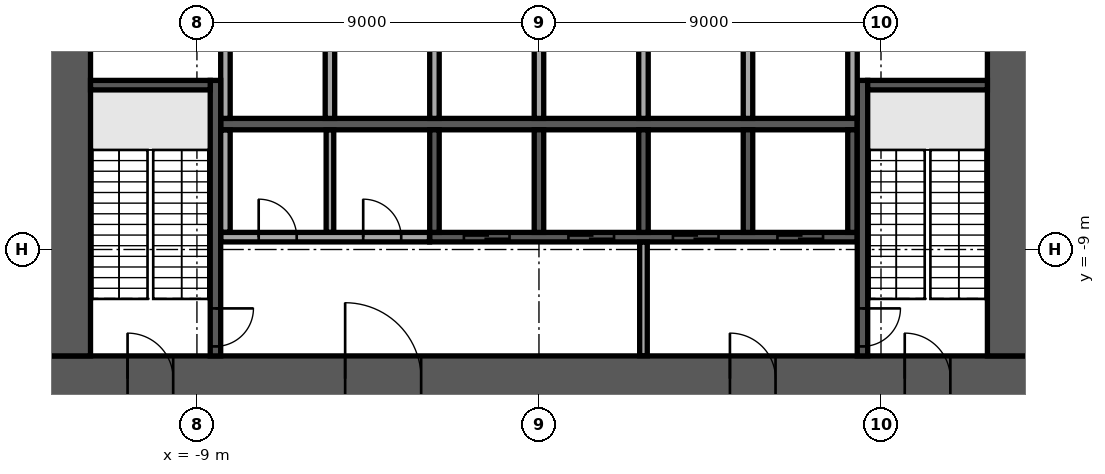
"""IFC4 building model, lengths in metres.
Left out: names, types, materials, properties, quantities, classifications, styles, units other than length and angle.
Written with IfcOpenShell. Run it as: python <this file> out.ifc"""

import sys

from ifc_helpers import new_model, si_unit, direction, frame, frame_2d, origin, place, context, subcontext, project, spatial, rectangle, extrude, element, fill, save


model = new_model("IFC4")
c1 = context("Model", 3, precision=1e-05, world=origin(), true_north=direction((0.0, 1.0)))
c2 = subcontext(c1, "Body", "Model", "MODEL_VIEW")
j1 = project(units=[si_unit("LENGTHUNIT", "METRE"), si_unit("PLANEANGLEUNIT", "RADIAN")], contexts=[c1])
p1 = place(None, origin())
s1 = spatial("IfcSite", under=j1, at=p1, CompositionType="ELEMENT")
p2 = place(p1, origin())
s2 = spatial("IfcBuilding", under=s1, at=p2, CompositionType="ELEMENT")
p3 = place(p2, frame((0.0, 0.0, 76.5)))
s3 = spatial("IfcBuildingStorey", under=s2, at=p3, CompositionType="ELEMENT", Elevation=76.5)
p4 = place(p3, frame((-13.0, -12.4, 0.0), z_axis=(0.0, 0.0, 1.0), x_axis=(1.0, 0.0, 0.0)))
e1 = element("IfcWall", 1, at=p4, inside=s3, PredefinedType="SHEAR", context=c2, shape_type="SweptSolid", body=[
    extrude(rectangle(XDim=26.0, YDim=1.2, at=frame_2d((13.0, 0.0))), origin(), (0.0, 0.0, 1.0), 5.18),
])
p5 = place(p4, frame((7.9, 0.0, 0.0)))
e2 = element("IfcOpeningElement", 2, at=p5, cuts=e1, PredefinedType="OPENING", context=c2, shape_type="SweptSolid", body=[
    extrude(rectangle(XDim=2.0, YDim=2.1, at=frame_2d((1.0, 1.05))), frame((0.0, 0.61, 0.0), z_axis=(0.0, -1.0, 0.0), x_axis=(1.0, 0.0, 0.0)), (0.0, 0.0, 1.0), 1.22),
])
p6 = place(p4, frame((18.025, 0.0, 0.0)))
e3 = element("IfcOpeningElement", 3, at=p6, cuts=e1, PredefinedType="OPENING", context=c2, shape_type="SweptSolid", body=[
    extrude(rectangle(XDim=1.2, YDim=2.1, at=frame_2d((0.6, 1.05))), frame((0.0, 0.61, 0.0), z_axis=(0.0, -1.0, 0.0), x_axis=(1.0, 0.0, 0.0)), (0.0, 0.0, 1.0), 1.22),
])
p7 = place(p4, frame((2.175, 0.0, 0.0)))
e4 = element("IfcOpeningElement", 4, at=p7, cuts=e1, PredefinedType="OPENING", context=c2, shape_type="SweptSolid", body=[
    extrude(rectangle(XDim=1.2, YDim=2.1, at=frame_2d((0.6, 1.05))), frame((0.0, 0.61, 0.0), z_axis=(0.0, -1.0, 0.0), x_axis=(1.0, 0.0, 0.0)), (0.0, 0.0, 1.0), 1.22),
])
p8 = place(p4, frame((22.625, 0.0, 0.0)))
e5 = element("IfcOpeningElement", 5, at=p8, cuts=e1, PredefinedType="OPENING", context=c2, shape_type="SweptSolid", body=[
    extrude(rectangle(XDim=1.2, YDim=2.1, at=frame_2d((0.6, 1.05))), frame((0.0, 0.61, 0.0), z_axis=(0.0, -1.0, 0.0), x_axis=(1.0, 0.0, 0.0)), (0.0, 0.0, 1.0), 1.22),
])
p9 = place(p3, frame((12.4, -11.8, 0.0), z_axis=(0.0, 0.0, 1.0), x_axis=(0.0, 1.0, 0.0)))
e6 = element("IfcWall", 6, at=p9, inside=s3, PredefinedType="SHEAR", context=c2, shape_type="SweptSolid", body=[
    extrude(rectangle(XDim=23.6, YDim=1.2, at=frame_2d((11.8, 0.0))), origin(), (0.0, 0.0, 1.0), 5.18),
])
p10 = place(p9, frame((10.6, 0.0, 0.0)))
e7 = element("IfcOpeningElement", 7, at=p10, cuts=e6, PredefinedType="OPENING", context=c2, shape_type="SweptSolid", body=[
    extrude(rectangle(XDim=2.4, YDim=2.4, at=frame_2d((1.2, 1.2))), frame((0.0, 0.61, 0.0), z_axis=(0.0, -1.0, 0.0), x_axis=(1.0, 0.0, 0.0)), (0.0, 0.0, 1.0), 1.22),
])
p11 = place(p3, frame((-12.4, -11.8, 0.0), z_axis=(0.0, 0.0, 1.0), x_axis=(0.0, 1.0, 0.0)))
e8 = element("IfcWall", 8, at=p11, inside=s3, PredefinedType="SHEAR", context=c2, shape_type="SweptSolid", body=[
    extrude(rectangle(XDim=23.6, YDim=1.2, at=frame_2d((11.8, 0.0))), origin(), (0.0, 0.0, 1.0), 5.18),
])
p12 = place(p11, frame((10.6, 0.0, 0.0)))
e9 = element("IfcOpeningElement", 9, at=p12, cuts=e8, PredefinedType="OPENING", context=c2, shape_type="SweptSolid", body=[
    extrude(rectangle(XDim=2.4, YDim=2.4, at=frame_2d((1.2, 1.2))), frame((0.0, 0.61, 0.0), z_axis=(0.0, -1.0, 0.0), x_axis=(1.0, 0.0, 0.0)), (0.0, 0.0, 1.0), 1.22),
])
p13 = place(p3, frame((-8.375, -5.7, 0.0), z_axis=(0.0, 0.0, 1.0), x_axis=(1.0, 0.0, 0.0)))
e10 = element("IfcWall", 10, at=p13, inside=s3, PredefinedType="SOLIDWALL", context=c2, shape_type="SweptSolid", body=[
    extrude(rectangle(XDim=16.75, YDim=0.3, at=frame_2d((8.375, 0.0))), origin(), (0.0, 0.0, 1.0), 5.18),
])
for number, where, z_axis, x_axis in (
    (11, (-8.25, -5.55, 0.0), (0.0, 0.0, 1.0), (0.0, 1.0, 0.0)),
    (12, (-5.5, -5.55, 0.0), (0.0, 0.0, 1.0), (0.0, 1.0, 0.0)),
    (13, (-2.75, -5.55, 0.0), (0.0, 0.0, 1.0), (0.0, 1.0, 0.0)),
    (14, (0.0, -5.55, 0.0), (0.0, 0.0, 1.0), (0.0, 1.0, 0.0)),
    (15, (2.75, -5.55, 0.0), (0.0, 0.0, 1.0), (0.0, 1.0, 0.0)),
    (16, (5.5, -5.55, 0.0), (0.0, 0.0, 1.0), (0.0, 1.0, 0.0)),
):
    element("IfcWall", number, at=place(p3, frame(where, z_axis=z_axis, x_axis=x_axis)), inside=s3, PredefinedType="SOLIDWALL", context=c2, shape_type="SweptSolid", body=[
        extrude(rectangle(XDim=2.7, YDim=0.25, at=frame_2d((1.35, 0.0))), origin(), (0.0, 0.0, 1.0), 5.18),
    ])
p14 = place(p3, frame((-2.875, -8.675, 0.0), z_axis=(0.0, 0.0, 1.0), x_axis=(1.0, 0.0, 0.0)))
e17 = element("IfcWall", 17, at=p14, inside=s3, PredefinedType="SOLIDWALL", context=c2, shape_type="SweptSolid", body=[
    extrude(rectangle(XDim=11.25, YDim=0.25, at=frame_2d((5.625, 0.0))), origin(), (0.0, 0.0, 1.0), 5.18),
])
p15 = place(p14, frame((0.9, 0.0, 0.0)))
e18 = element("IfcOpeningElement", 18, at=p15, cuts=e17, PredefinedType="OPENING", context=c2, shape_type="SweptSolid", body=[
    extrude(rectangle(XDim=1.2, YDim=2.1, at=frame_2d((0.6, 1.05))), frame((0.0, 0.135, 0.0), z_axis=(0.0, -1.0, 0.0), x_axis=(1.0, 0.0, 0.0)), (0.0, 0.0, 1.0), 0.27),
])
p16 = place(p14, frame((3.65, 0.0, 0.0)))
e19 = element("IfcOpeningElement", 19, at=p16, cuts=e17, PredefinedType="OPENING", context=c2, shape_type="SweptSolid", body=[
    extrude(rectangle(XDim=1.2, YDim=2.1, at=frame_2d((0.6, 1.05))), frame((0.0, 0.135, 0.0), z_axis=(0.0, -1.0, 0.0), x_axis=(1.0, 0.0, 0.0)), (0.0, 0.0, 1.0), 0.27),
])
p17 = place(p14, frame((6.4, 0.0, 0.0)))
e20 = element("IfcOpeningElement", 20, at=p17, cuts=e17, PredefinedType="OPENING", context=c2, shape_type="SweptSolid", body=[
    extrude(rectangle(XDim=1.2, YDim=2.1, at=frame_2d((0.6, 1.05))), frame((0.0, 0.135, 0.0), z_axis=(0.0, -1.0, 0.0), x_axis=(1.0, 0.0, 0.0)), (0.0, 0.0, 1.0), 0.27),
])
p18 = place(p14, frame((9.15, 0.0, 0.0)))
e21 = element("IfcOpeningElement", 21, at=p18, cuts=e17, PredefinedType="OPENING", context=c2, shape_type="SweptSolid", body=[
    extrude(rectangle(XDim=1.2, YDim=2.1, at=frame_2d((0.6, 1.05))), frame((0.0, 0.135, 0.0), z_axis=(0.0, -1.0, 0.0), x_axis=(1.0, 0.0, 0.0)), (0.0, 0.0, 1.0), 0.27),
])
for number, where, z_axis, x_axis in (
    (22, (-2.75, -8.55, 0.0), (0.0, 0.0, 1.0), (0.0, 1.0, 0.0)),
    (23, (0.0, -8.55, 0.0), (0.0, 0.0, 1.0), (0.0, 1.0, 0.0)),
    (24, (2.75, -8.55, 0.0), (0.0, 0.0, 1.0), (0.0, 1.0, 0.0)),
    (25, (5.5, -8.55, 0.0), (0.0, 0.0, 1.0), (0.0, 1.0, 0.0)),
    (26, (8.25, -8.55, 0.0), (0.0, 0.0, 1.0), (0.0, 1.0, 0.0)),
):
    element("IfcWall", number, at=place(p3, frame(where, z_axis=z_axis, x_axis=x_axis)), inside=s3, PredefinedType="SOLIDWALL", context=c2, shape_type="SweptSolid", body=[
        extrude(rectangle(XDim=2.7, YDim=0.25, at=frame_2d((1.35, 0.0))), origin(), (0.0, 0.0, 1.0), 5.18),
    ])
p19 = place(p3, frame((-8.512, -4.55, 0.0), z_axis=(0.0, 0.0, 1.0), x_axis=(0.0, -1.0, 0.0)))
e27 = element("IfcWall", 27, at=p19, inside=s3, PredefinedType="SOLIDWALL", context=c2, shape_type="SweptSolid", body=[
    extrude(rectangle(XDim=7.25, YDim=0.275, at=frame_2d((3.625, 0.0))), origin(), (0.0, 0.0, 1.0), 5.18),
])
p20 = place(p19, frame((6.0, 0.0, 0.0)))
e28 = element("IfcOpeningElement", 28, at=p20, cuts=e27, PredefinedType="OPENING", context=c2, shape_type="SweptSolid", body=[
    extrude(rectangle(XDim=1.0, YDim=2.1, at=frame_2d((0.5, 1.05))), frame((0.0, 0.147, 0.0), z_axis=(0.0, -1.0, 0.0), x_axis=(1.0, 0.0, 0.0)), (0.0, 0.0, 1.0), 0.295),
])
p21 = place(p3, frame((-8.65, -4.675, 0.0), z_axis=(0.0, 0.0, 1.0), x_axis=(-1.0, 0.0, 0.0)))
e29 = element("IfcWall", 29, at=p21, inside=s3, PredefinedType="SOLIDWALL", context=c2, shape_type="SweptSolid", body=[
    extrude(rectangle(XDim=3.15, YDim=0.25, at=frame_2d((1.575, 0.0))), origin(), (0.0, 0.0, 1.0), 5.18),
])
p22 = place(p3, frame((8.512, -4.55, 0.0), z_axis=(0.0, 0.0, 1.0), x_axis=(0.0, -1.0, 0.0)))
e30 = element("IfcWall", 30, at=p22, inside=s3, PredefinedType="SOLIDWALL", context=c2, shape_type="SweptSolid", body=[
    extrude(rectangle(XDim=7.25, YDim=0.275, at=frame_2d((3.625, 0.0))), origin(), (0.0, 0.0, 1.0), 5.18),
])
p23 = place(p22, frame((6.0, 0.0, 0.0)))
e31 = element("IfcOpeningElement", 31, at=p23, cuts=e30, PredefinedType="OPENING", context=c2, shape_type="SweptSolid", body=[
    extrude(rectangle(XDim=1.0, YDim=2.1, at=frame_2d((0.5, 1.05))), frame((0.0, 0.147, 0.0), z_axis=(0.0, -1.0, 0.0), x_axis=(1.0, 0.0, 0.0)), (0.0, 0.0, 1.0), 0.295),
])
p24 = place(p3, frame((8.65, -4.675, 0.0), z_axis=(0.0, 0.0, 1.0), x_axis=(1.0, 0.0, 0.0)))
e32 = element("IfcWall", 32, at=p24, inside=s3, PredefinedType="SOLIDWALL", context=c2, shape_type="SweptSolid", body=[
    extrude(rectangle(XDim=3.15, YDim=0.25, at=frame_2d((1.575, 0.0))), origin(), (0.0, 0.0, 1.0), 5.18),
])
p25 = place(p3, frame((2.75, -11.795, 0.0), z_axis=(0.0, 0.0, 1.0), x_axis=(0.0, 1.0, 0.0)))
e33 = element("IfcWall", 33, at=p25, inside=s3, PredefinedType="PARTITIONING", context=c2, shape_type="SweptSolid", body=[
    extrude(rectangle(XDim=2.99, YDim=0.2, at=frame_2d((1.495, 0.0))), origin(), (0.0, 0.0, 1.0), 5.18),
])
p26 = place(p3, frame((-8.37, -8.675, 0.0), z_axis=(0.0, 0.0, 1.0), x_axis=(1.0, 0.0, 0.0)))
e34 = element("IfcWall", 34, at=p26, inside=s3, PredefinedType="PARTITIONING", context=c2, shape_type="SweptSolid", body=[
    extrude(rectangle(XDim=5.49, YDim=0.25, at=frame_2d((2.745, 0.0))), origin(), (0.0, 0.0, 1.0), 5.18),
])
p27 = place(p26, frame((0.995, 0.0, 0.0)))
e35 = element("IfcOpeningElement", 35, at=p27, cuts=e34, PredefinedType="OPENING", context=c2, shape_type="SweptSolid", body=[
    extrude(rectangle(XDim=1.0, YDim=2.1, at=frame_2d((0.5, 1.05))), frame((0.0, 0.135, 0.0), z_axis=(0.0, -1.0, 0.0), x_axis=(1.0, 0.0, 0.0)), (0.0, 0.0, 1.0), 0.27),
])
p28 = place(p26, frame((3.745, 0.0, 0.0)))
e36 = element("IfcOpeningElement", 36, at=p28, cuts=e34, PredefinedType="OPENING", context=c2, shape_type="SweptSolid", body=[
    extrude(rectangle(XDim=1.0, YDim=2.1, at=frame_2d((0.5, 1.05))), frame((0.0, 0.135, 0.0), z_axis=(0.0, -1.0, 0.0), x_axis=(1.0, 0.0, 0.0)), (0.0, 0.0, 1.0), 0.27),
])
p29 = place(p3, frame((-8.25, -8.545, 0.0), z_axis=(0.0, 0.0, 1.0), x_axis=(0.0, 1.0, 0.0)))
e37 = element("IfcWall", 37, at=p29, inside=s3, PredefinedType="PARTITIONING", context=c2, shape_type="SweptSolid", body=[
    extrude(rectangle(XDim=2.69, YDim=0.25, at=frame_2d((1.345, 0.0))), origin(), (0.0, 0.0, 1.0), 5.18),
])
p30 = place(p3, frame((-5.5, -8.545, 0.0), z_axis=(0.0, 0.0, 1.0), x_axis=(0.0, 1.0, 0.0)))
e38 = element("IfcWall", 38, at=p30, inside=s3, PredefinedType="PARTITIONING", context=c2, shape_type="SweptSolid", body=[
    extrude(rectangle(XDim=2.69, YDim=0.2, at=frame_2d((1.345, 0.0))), origin(), (0.0, 0.0, 1.0), 5.18),
])
p31 = place(p3, frame((8.25, -5.545, 0.0), z_axis=(0.0, 0.0, 1.0), x_axis=(0.0, 1.0, 0.0)))
e39 = element("IfcWall", 39, at=p31, inside=s3, PredefinedType="PARTITIONING", context=c2, shape_type="SweptSolid", body=[
    extrude(rectangle(XDim=2.69, YDim=0.25, at=frame_2d((1.345, 0.0))), origin(), (0.0, 0.0, 1.0), 5.18),
])
p32 = place(p5, origin())
e40 = element("IfcDoor", 40, at=p32, inside=s3, OperationType="SINGLE_SWING_LEFT", PredefinedType="DOOR", context=c2, shape_type="SweptSolid", body=[
    extrude(rectangle(XDim=2.0, YDim=2.1, at=frame_2d((1.0, 1.05))), frame((0.0, 0.025, 0.0), z_axis=(0.0, -1.0, 0.0), x_axis=(1.0, 0.0, 0.0)), (0.0, 0.0, 1.0), 0.05),
])
fill(e2, e40)
p33 = place(p6, origin())
e41 = element("IfcDoor", 41, at=p33, inside=s3, OperationType="SINGLE_SWING_LEFT", PredefinedType="DOOR", context=c2, shape_type="SweptSolid", body=[
    extrude(rectangle(XDim=1.2, YDim=2.1, at=frame_2d((0.6, 1.05))), frame((0.0, 0.025, 0.0), z_axis=(0.0, -1.0, 0.0), x_axis=(1.0, 0.0, 0.0)), (0.0, 0.0, 1.0), 0.05),
])
fill(e3, e41)
p34 = place(p7, origin())
e42 = element("IfcDoor", 42, at=p34, inside=s3, OperationType="SINGLE_SWING_LEFT", PredefinedType="DOOR", context=c2, shape_type="SweptSolid", body=[
    extrude(rectangle(XDim=1.2, YDim=2.1, at=frame_2d((0.6, 1.05))), frame((0.0, 0.025, 0.0), z_axis=(0.0, -1.0, 0.0), x_axis=(1.0, 0.0, 0.0)), (0.0, 0.0, 1.0), 0.05),
])
fill(e4, e42)
p35 = place(p8, origin())
e43 = element("IfcDoor", 43, at=p35, inside=s3, OperationType="SINGLE_SWING_LEFT", PredefinedType="DOOR", context=c2, shape_type="SweptSolid", body=[
    extrude(rectangle(XDim=1.2, YDim=2.1, at=frame_2d((0.6, 1.05))), frame((0.0, 0.025, 0.0), z_axis=(0.0, -1.0, 0.0), x_axis=(1.0, 0.0, 0.0)), (0.0, 0.0, 1.0), 0.05),
])
fill(e5, e43)
p36 = place(p15, origin())
e44 = element("IfcDoor", 44, at=p36, inside=s3, OperationType="DOUBLE_DOOR_SLIDING", PredefinedType="DOOR", context=c2, shape_type="SweptSolid", body=[
    extrude(rectangle(XDim=1.2, YDim=2.1, at=frame_2d((0.6, 1.05))), frame((0.0, 0.025, 0.0), z_axis=(0.0, -1.0, 0.0), x_axis=(1.0, 0.0, 0.0)), (0.0, 0.0, 1.0), 0.05),
])
fill(e18, e44)
p37 = place(p16, origin())
e45 = element("IfcDoor", 45, at=p37, inside=s3, OperationType="DOUBLE_DOOR_SLIDING", PredefinedType="DOOR", context=c2, shape_type="SweptSolid", body=[
    extrude(rectangle(XDim=1.2, YDim=2.1, at=frame_2d((0.6, 1.05))), frame((0.0, 0.025, 0.0), z_axis=(0.0, -1.0, 0.0), x_axis=(1.0, 0.0, 0.0)), (0.0, 0.0, 1.0), 0.05),
])
fill(e19, e45)
p38 = place(p17, origin())
e46 = element("IfcDoor", 46, at=p38, inside=s3, OperationType="DOUBLE_DOOR_SLIDING", PredefinedType="DOOR", context=c2, shape_type="SweptSolid", body=[
    extrude(rectangle(XDim=1.2, YDim=2.1, at=frame_2d((0.6, 1.05))), frame((0.0, 0.025, 0.0), z_axis=(0.0, -1.0, 0.0), x_axis=(1.0, 0.0, 0.0)), (0.0, 0.0, 1.0), 0.05),
])
fill(e20, e46)
p39 = place(p18, origin())
e47 = element("IfcDoor", 47, at=p39, inside=s3, OperationType="DOUBLE_DOOR_SLIDING", PredefinedType="DOOR", context=c2, shape_type="SweptSolid", body=[
    extrude(rectangle(XDim=1.2, YDim=2.1, at=frame_2d((0.6, 1.05))), frame((0.0, 0.025, 0.0), z_axis=(0.0, -1.0, 0.0), x_axis=(1.0, 0.0, 0.0)), (0.0, 0.0, 1.0), 0.05),
])
fill(e21, e47)
p40 = place(p20, origin())
e48 = element("IfcDoor", 48, at=p40, inside=s3, OperationType="SINGLE_SWING_LEFT", PredefinedType="DOOR", context=c2, shape_type="SweptSolid", body=[
    extrude(rectangle(XDim=1.0, YDim=2.1, at=frame_2d((0.5, 1.05))), frame((0.0, 0.025, 0.0), z_axis=(0.0, -1.0, 0.0), x_axis=(1.0, 0.0, 0.0)), (0.0, 0.0, 1.0), 0.05),
])
fill(e28, e48)
p41 = place(p23, origin())
e49 = element("IfcDoor", 49, at=p41, inside=s3, OperationType="SINGLE_SWING_LEFT", PredefinedType="DOOR", context=c2, shape_type="SweptSolid", body=[
    extrude(rectangle(XDim=1.0, YDim=2.1, at=frame_2d((0.5, 1.05))), frame((0.0, 0.025, 0.0), z_axis=(0.0, -1.0, 0.0), x_axis=(1.0, 0.0, 0.0)), (0.0, 0.0, 1.0), 0.05),
])
fill(e31, e49)
p42 = place(p27, origin())
e50 = element("IfcDoor", 50, at=p42, inside=s3, OperationType="SINGLE_SWING_RIGHT", PredefinedType="DOOR", context=c2, shape_type="SweptSolid", body=[
    extrude(rectangle(XDim=1.0, YDim=2.1, at=frame_2d((0.5, 1.05))), frame((0.0, 0.025, 0.0), z_axis=(0.0, -1.0, 0.0), x_axis=(1.0, 0.0, 0.0)), (0.0, 0.0, 1.0), 0.05),
])
fill(e35, e50)
p43 = place(p28, origin())
e51 = element("IfcDoor", 51, at=p43, inside=s3, OperationType="SINGLE_SWING_RIGHT", PredefinedType="DOOR", context=c2, shape_type="SweptSolid", body=[
    extrude(rectangle(XDim=1.0, YDim=2.1, at=frame_2d((0.5, 1.05))), frame((0.0, 0.025, 0.0), z_axis=(0.0, -1.0, 0.0), x_axis=(1.0, 0.0, 0.0)), (0.0, 0.0, 1.0), 0.05),
])
fill(e36, e51)
save(model, sys.argv[1])
